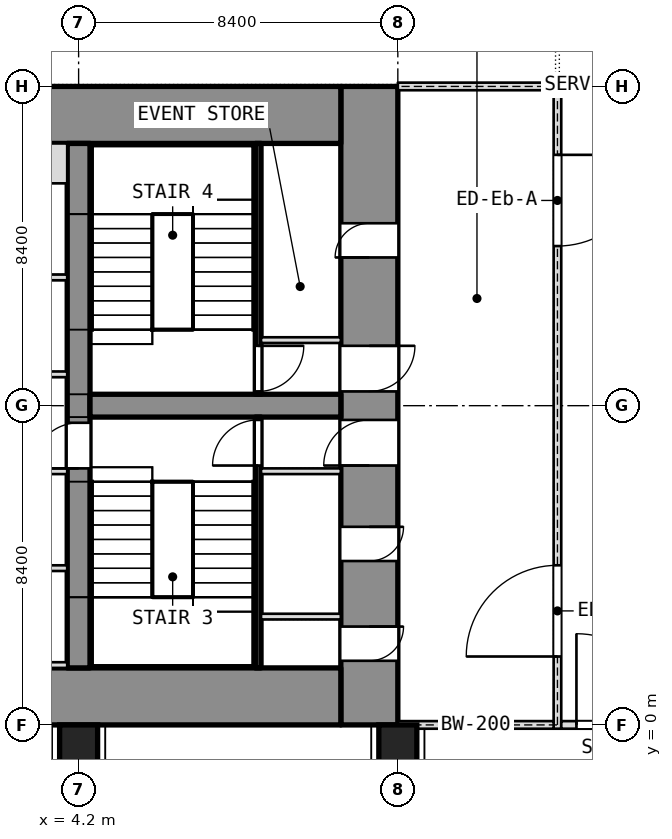
"""IFC4 building model, lengths in metres.
Left out: names, types, materials, properties, quantities, classifications, styles, units other than length and angle.
Written with IfcOpenShell. Run it as: python <this file> out.ifc"""

import sys

from ifc_helpers import new_model, si_unit, direction, frame, frame_2d, origin, origin_2d, place, context, subcontext, project, spatial, rectangle, extrude, element, fill, save


model = new_model("IFC4")
c1 = context("Model", 3, precision=1e-05, world=origin(), true_north=direction((0.0, 1.0)))
c2 = subcontext(c1, "Body", "Model", "MODEL_VIEW")
j1 = project(units=[si_unit("LENGTHUNIT", "METRE"), si_unit("PLANEANGLEUNIT", "RADIAN")], contexts=[c1])
p1 = place(None, origin())
s1 = spatial("IfcSite", under=j1, at=p1, CompositionType="ELEMENT")
p2 = place(p1, origin())
s2 = spatial("IfcBuilding", under=s1, at=p2, CompositionType="ELEMENT")
p3 = place(p2, frame((0.0, 0.0, 31.0)))
s3 = spatial("IfcBuildingStorey", under=s2, at=p3, CompositionType="ELEMENT", Elevation=31.0)
p4 = place(p3, frame((11.85, 0.0, 0.0), z_axis=(0.0, 0.0, 1.0), x_axis=(0.0, 1.0, 0.0)))
e1 = element("IfcWall", 1, at=p4, inside=s3, PredefinedType="SHEAR", context=c2, shape_type="SweptSolid", body=[
    extrude(rectangle(XDim=16.8, YDim=1.5, at=frame_2d((8.4, 0.0))), origin(), (0.0, 0.0, 1.0), 5.5),
])
p5 = place(p4, frame((1.688, 0.0, 0.0)))
e2 = element("IfcOpeningElement", 2, at=p5, cuts=e1, PredefinedType="OPENING", context=c2, shape_type="SweptSolid", body=[
    extrude(rectangle(XDim=0.9, YDim=2.1, at=frame_2d((0.45, 1.05))), frame((0.0, 0.75, 0.0), z_axis=(0.0, -1.0, 0.0), x_axis=(1.0, 0.0, 0.0)), (0.0, 0.0, 1.0), 1.5),
])
p6 = place(p4, frame((4.312, 0.0, 0.0)))
e3 = element("IfcOpeningElement", 3, at=p6, cuts=e1, PredefinedType="OPENING", context=c2, shape_type="SweptSolid", body=[
    extrude(rectangle(XDim=0.9, YDim=2.1, at=frame_2d((0.45, 1.05))), frame((0.0, 0.75, 0.0), z_axis=(0.0, -1.0, 0.0), x_axis=(1.0, 0.0, 0.0)), (0.0, 0.0, 1.0), 1.5),
])
p7 = place(p4, frame((6.825, 0.0, 0.0)))
e4 = element("IfcOpeningElement", 4, at=p7, cuts=e1, PredefinedType="OPENING", context=c2, shape_type="SweptSolid", body=[
    extrude(rectangle(XDim=1.2, YDim=2.1, at=frame_2d((0.6, 1.05))), frame((0.0, 0.75, 0.0), z_axis=(0.0, -1.0, 0.0), x_axis=(1.0, 0.0, 0.0)), (0.0, 0.0, 1.0), 1.5),
])
p8 = place(p4, frame((12.3, 0.0, 0.0)))
e5 = element("IfcOpeningElement", 5, at=p8, cuts=e1, PredefinedType="OPENING", context=c2, shape_type="SweptSolid", body=[
    extrude(rectangle(XDim=0.9, YDim=2.1, at=frame_2d((0.45, 1.05))), frame((0.0, 0.75, 0.0), z_axis=(0.0, -1.0, 0.0), x_axis=(1.0, 0.0, 0.0)), (0.0, 0.0, 1.0), 1.5),
])
p9 = place(p4, frame((8.775, 0.0, 0.0)))
e6 = element("IfcOpeningElement", 6, at=p9, cuts=e1, PredefinedType="OPENING", context=c2, shape_type="SweptSolid", body=[
    extrude(rectangle(XDim=1.2, YDim=2.1, at=frame_2d((0.6, 1.05))), frame((0.0, 0.75, 0.0), z_axis=(0.0, -1.0, 0.0), x_axis=(1.0, 0.0, 0.0)), (0.0, 0.0, 1.0), 1.5),
])
for number, where, z_axis, x_axis in (
    (7, (-11.1, 0.75, 0.0), (0.0, 0.0, 1.0), (1.0, 0.0, 0.0)),
    (8, (-11.1, 16.05, 0.0), (0.0, 0.0, 1.0), (1.0, 0.0, 0.0)),
):
    element("IfcWall", number, at=place(p3, frame(where, z_axis=z_axis, x_axis=x_axis)), inside=s3, PredefinedType="SHEAR", context=c2, shape_type="SweptSolid", body=[
        extrude(rectangle(XDim=22.2, YDim=1.5, at=frame_2d((11.1, 0.0))), origin(), (0.0, 0.0, 1.0), 5.5),
    ])
p10 = place(p3, frame((4.2, 1.5, 0.0), z_axis=(0.0, 0.0, 1.0), x_axis=(0.0, 1.0, 0.0)))
e9 = element("IfcWall", 9, at=p10, inside=s3, PredefinedType="SHEAR", context=c2, shape_type="SweptSolid", body=[
    extrude(rectangle(XDim=13.8, YDim=0.6, at=frame_2d((6.9, 0.0))), origin(), (0.0, 0.0, 1.0), 5.5),
])
p11 = place(p10, frame((5.25, 0.0, 0.0)))
e10 = element("IfcOpeningElement", 10, at=p11, cuts=e9, PredefinedType="OPENING", context=c2, shape_type="SweptSolid", body=[
    extrude(rectangle(XDim=1.2, YDim=2.1, at=frame_2d((0.6, 1.05))), frame((0.0, 0.3, 0.0), z_axis=(0.0, -1.0, 0.0), x_axis=(1.0, 0.0, 0.0)), (0.0, 0.0, 1.0), 0.6),
])
p12 = place(p3, frame((4.5, 8.4, 0.0), z_axis=(0.0, 0.0, 1.0), x_axis=(1.0, 0.0, 0.0)))
e11 = element("IfcWall", 11, at=p12, inside=s3, PredefinedType="SHEAR", context=c2, shape_type="SweptSolid", body=[
    extrude(rectangle(XDim=6.6, YDim=0.6, at=frame_2d((3.3, 0.0))), origin(), (0.0, 0.0, 1.0), 5.5),
])
for number, where, z_axis, x_axis in (
    (12, (4.2, -0.5, 0.0), (0.0, 0.0, 1.0), (1.0, 0.0, 0.0)),
    (13, (12.6, -0.5, 0.0), (0.0, 0.0, 1.0), (1.0, 0.0, 0.0)),
):
    element("IfcColumn", number, at=place(p3, frame(where, z_axis=z_axis, x_axis=x_axis)), inside=s3, PredefinedType="COLUMN", context=c2, shape_type="SweptSolid", body=[
        extrude(rectangle(XDim=1.0, YDim=1.0, at=origin_2d()), origin(), (0.0, 0.0, 1.0), 5.5),
    ])
p13 = place(p3, frame((8.925, 1.5, 0.0), z_axis=(0.0, 0.0, 1.0), x_axis=(0.0, 1.0, 0.0)))
e14 = element("IfcWall", 14, at=p13, inside=s3, PredefinedType="SHEAR", context=c2, shape_type="SweptSolid", body=[
    extrude(rectangle(XDim=6.6, YDim=0.15, at=frame_2d((3.3, 0.0))), origin(), (0.0, 0.0, 1.0), 5.35),
])
p14 = place(p13, frame((5.325, 0.0, 0.0)))
e15 = element("IfcOpeningElement", 15, at=p14, cuts=e14, PredefinedType="OPENING", context=c2, shape_type="SweptSolid", body=[
    extrude(rectangle(XDim=1.2, YDim=2.1, at=frame_2d((0.6, 1.05))), frame((0.0, 0.075, 0.0), z_axis=(0.0, -1.0, 0.0), x_axis=(1.0, 0.0, 0.0)), (0.0, 0.0, 1.0), 0.15),
])
for number, where, z_axis, x_axis in (
    (16, (9.0, 6.675, 0.0), (0.0, 0.0, 1.0), (1.0, 0.0, 0.0)),
    (17, (9.0, 2.85, 0.0), (0.0, 0.0, 1.0), (1.0, 0.0, 0.0)),
):
    element("IfcWall", number, at=place(p3, frame(where, z_axis=z_axis, x_axis=x_axis)), inside=s3, PredefinedType="PARTITIONING", context=c2, shape_type="SweptSolid", body=[
        extrude(rectangle(XDim=2.1, YDim=0.15, at=frame_2d((1.05, 0.0))), origin(), (0.0, 0.0, 1.0), 5.35),
    ])
p15 = place(p3, frame((8.925, 8.7, 0.0), z_axis=(0.0, 0.0, 1.0), x_axis=(0.0, 1.0, 0.0)))
e18 = element("IfcWall", 18, at=p15, inside=s3, PredefinedType="SHEAR", context=c2, shape_type="SweptSolid", body=[
    extrude(rectangle(XDim=6.6, YDim=0.15, at=frame_2d((3.3, 0.0))), origin(), (0.0, 0.0, 1.0), 5.35),
])
p16 = place(p15, frame((0.075, 0.0, 0.0)))
e19 = element("IfcOpeningElement", 19, at=p16, cuts=e18, PredefinedType="OPENING", context=c2, shape_type="SweptSolid", body=[
    extrude(rectangle(XDim=1.2, YDim=2.1, at=frame_2d((0.6, 1.05))), frame((0.0, 0.075, 0.0), z_axis=(0.0, -1.0, 0.0), x_axis=(1.0, 0.0, 0.0)), (0.0, 0.0, 1.0), 0.15),
])
p17 = place(p3, frame((9.0, 10.125, 0.0), z_axis=(0.0, 0.0, 1.0), x_axis=(1.0, 0.0, 0.0)))
e20 = element("IfcWall", 20, at=p17, inside=s3, PredefinedType="PARTITIONING", context=c2, shape_type="SweptSolid", body=[
    extrude(rectangle(XDim=2.1, YDim=0.15, at=frame_2d((1.05, 0.0))), origin(), (0.0, 0.0, 1.0), 5.35),
])
p18 = place(p3, frame((-3.9, 4.125, 0.0), z_axis=(0.0, 0.0, 1.0), x_axis=(1.0, 0.0, 0.0)))
e21 = element("IfcWall", 21, at=p18, inside=s3, PredefinedType="PARTITIONING", context=c2, shape_type="SweptSolid", body=[
    extrude(rectangle(XDim=7.8, YDim=0.15, at=frame_2d((3.9, 0.0))), origin(), (0.0, 0.0, 1.0), 5.35),
])
p19 = place(p18, frame((3.75, 0.0, 0.0)))
e22 = element("IfcOpeningElement", 22, at=p19, cuts=e21, PredefinedType="OPENING", context=c2, shape_type="SweptSolid", body=[
    extrude(rectangle(XDim=1.2, YDim=2.1, at=frame_2d((0.6, 1.05))), frame((0.0, 0.075, 0.0), z_axis=(0.0, -1.0, 0.0), x_axis=(1.0, 0.0, 0.0)), (0.0, 0.0, 1.0), 0.15),
])
p20 = place(p3, frame((-3.9, 11.775, 0.0), z_axis=(0.0, 0.0, 1.0), x_axis=(1.0, 0.0, 0.0)))
e23 = element("IfcWall", 23, at=p20, inside=s3, PredefinedType="PARTITIONING", context=c2, shape_type="SweptSolid", body=[
    extrude(rectangle(XDim=7.8, YDim=0.15, at=frame_2d((3.9, 0.0))), origin(), (0.0, 0.0, 1.0), 5.35),
])
p21 = place(p20, frame((3.3, 0.0, 0.0)))
e24 = element("IfcOpeningElement", 24, at=p21, cuts=e23, PredefinedType="OPENING", context=c2, shape_type="SweptSolid", body=[
    extrude(rectangle(XDim=1.2, YDim=2.1, at=frame_2d((0.6, 1.05))), frame((0.0, 0.075, 0.0), z_axis=(0.0, -1.0, 0.0), x_axis=(1.0, 0.0, 0.0)), (0.0, 0.0, 1.0), 0.15),
])
p22 = place(p3, frame((1.65, 1.575, 0.0), z_axis=(0.0, 0.0, 1.0), x_axis=(1.0, 0.0, 0.0)))
e25 = element("IfcWall", 25, at=p22, inside=s3, PredefinedType="SHEAR", context=c2, shape_type="SweptSolid", body=[
    extrude(rectangle(XDim=2.25, YDim=0.15, at=frame_2d((1.125, 0.0))), origin(), (0.0, 0.0, 1.0), 5.5),
])
p23 = place(p3, frame((1.65, 14.775, 0.0), z_axis=(0.0, 0.0, 1.0), x_axis=(1.0, 0.0, 0.0)))
e26 = element("IfcWall", 26, at=p23, inside=s3, PredefinedType="SHEAR", context=c2, shape_type="SweptSolid", body=[
    extrude(rectangle(XDim=2.25, YDim=1.05, at=frame_2d((1.125, 0.0))), origin(), (0.0, 0.0, 1.0), 5.5),
])
for number, where, z_axis, x_axis in (
    (27, (1.65, 6.675, 0.0), (0.0, 0.0, 1.0), (1.0, 0.0, 0.0)),
    (28, (1.65, 9.225, 0.0), (0.0, 0.0, 1.0), (1.0, 0.0, 0.0)),
):
    element("IfcWall", number, at=place(p3, frame(where, z_axis=z_axis, x_axis=x_axis)), inside=s3, PredefinedType="SHEAR", context=c2, shape_type="SweptSolid", body=[
        extrude(rectangle(XDim=2.25, YDim=0.15, at=frame_2d((1.125, 0.0))), origin(), (0.0, 0.0, 1.0), 5.5),
    ])
p24 = place(p3, frame((16.8, -0.1, 0.0), z_axis=(0.0, 0.0, 1.0), x_axis=(0.0, 1.0, 0.0)))
e29 = element("IfcWall", 29, at=p24, inside=s3, PredefinedType="PARTITIONING", context=c2, shape_type="SweptSolid", body=[
    extrude(rectangle(XDim=17.0, YDim=0.2, at=frame_2d((8.5, 0.0))), origin(), (0.0, 0.0, 1.0), 4.95),
])
p25 = place(p24, frame((1.9, 0.0, 0.0)))
e30 = element("IfcOpeningElement", 30, at=p25, cuts=e29, PredefinedType="OPENING", context=c2, shape_type="SweptSolid", body=[
    extrude(rectangle(XDim=2.4, YDim=2.1, at=frame_2d((1.2, 1.05))), frame((0.0, 0.1, 0.0), z_axis=(0.0, -1.0, 0.0), x_axis=(1.0, 0.0, 0.0)), (0.0, 0.0, 1.0), 0.2),
])
p26 = place(p24, frame((12.7, 0.0, 0.0)))
e31 = element("IfcOpeningElement", 31, at=p26, cuts=e29, PredefinedType="OPENING", context=c2, shape_type="SweptSolid", body=[
    extrude(rectangle(XDim=2.4, YDim=2.1, at=frame_2d((1.2, 1.05))), frame((0.0, 0.1, 0.0), z_axis=(0.0, -1.0, 0.0), x_axis=(1.0, 0.0, 0.0)), (0.0, 0.0, 1.0), 0.2),
])
for number, where, z_axis, x_axis in (
    (32, (12.6, 0.0, 0.0), (0.0, 0.0, 1.0), (1.0, 0.0, 0.0)),
    (33, (12.6, 16.8, 0.0), (0.0, 0.0, 1.0), (1.0, 0.0, 0.0)),
):
    element("IfcWall", number, at=place(p3, frame(where, z_axis=z_axis, x_axis=x_axis)), inside=s3, PredefinedType="PARTITIONING", context=c2, shape_type="SweptSolid", body=[
        extrude(rectangle(XDim=4.1, YDim=0.2, at=frame_2d((2.05, 0.0))), origin(), (0.0, 0.0, 1.0), 4.85),
    ])
p27 = place(p3, frame((16.901, 0.0, 0.0), z_axis=(0.0, 0.0, 1.0), x_axis=(1.0, 0.0, 0.0)))
e34 = element("IfcWall", 34, at=p27, inside=s3, PredefinedType="PARTITIONING", context=c2, shape_type="SweptSolid", body=[
    extrude(rectangle(XDim=3.198, YDim=0.2, at=frame_2d((1.599, 0.0))), origin(), (0.0, 0.0, 1.0), 4.85),
])
p28 = place(p27, frame((0.399, 0.0, 0.0)))
e35 = element("IfcOpeningElement", 35, at=p28, cuts=e34, PredefinedType="OPENING", context=c2, shape_type="SweptSolid", body=[
    extrude(rectangle(XDim=2.4, YDim=2.1, at=frame_2d((1.2, 1.05))), frame((0.0, 0.1, 0.0), z_axis=(0.0, -1.0, 0.0), x_axis=(1.0, 0.0, 0.0)), (0.0, 0.0, 1.0), 0.2),
])
p29 = place(p5, origin())
e36 = element("IfcDoor", 36, at=p29, inside=s3, OperationType="SINGLE_SWING_LEFT", PredefinedType="DOOR", context=c2, shape_type="SweptSolid", body=[
    extrude(rectangle(XDim=0.9, YDim=2.1, at=frame_2d((0.45, 1.05))), frame((0.0, 0.025, 0.0), z_axis=(0.0, -1.0, 0.0), x_axis=(1.0, 0.0, 0.0)), (0.0, 0.0, 1.0), 0.05),
])
fill(e2, e36)
p30 = place(p6, origin())
e37 = element("IfcDoor", 37, at=p30, inside=s3, OperationType="SINGLE_SWING_LEFT", PredefinedType="DOOR", context=c2, shape_type="SweptSolid", body=[
    extrude(rectangle(XDim=0.9, YDim=2.1, at=frame_2d((0.45, 1.05))), frame((0.0, 0.025, 0.0), z_axis=(0.0, -1.0, 0.0), x_axis=(1.0, 0.0, 0.0)), (0.0, 0.0, 1.0), 0.05),
])
fill(e3, e37)
p31 = place(p7, origin())
e38 = element("IfcDoor", 38, at=p31, inside=s3, OperationType="SINGLE_SWING_LEFT", PredefinedType="DOOR", context=c2, shape_type="SweptSolid", body=[
    extrude(rectangle(XDim=1.2, YDim=2.1, at=frame_2d((0.6, 1.05))), frame((0.0, 0.025, 0.0), z_axis=(0.0, -1.0, 0.0), x_axis=(1.0, 0.0, 0.0)), (0.0, 0.0, 1.0), 0.05),
])
fill(e4, e38)
p32 = place(p14, origin())
e39 = element("IfcDoor", 39, at=p32, inside=s3, OperationType="SINGLE_SWING_LEFT", PredefinedType="DOOR", context=c2, shape_type="SweptSolid", body=[
    extrude(rectangle(XDim=1.2, YDim=2.1, at=frame_2d((0.6, 1.05))), frame((0.0, 0.025, 0.0), z_axis=(0.0, -1.0, 0.0), x_axis=(1.0, 0.0, 0.0)), (0.0, 0.0, 1.0), 0.05),
])
fill(e15, e39)
p33 = place(p8, origin())
e40 = element("IfcDoor", 40, at=p33, inside=s3, OperationType="SINGLE_SWING_LEFT", PredefinedType="DOOR", context=c2, shape_type="SweptSolid", body=[
    extrude(rectangle(XDim=0.9, YDim=2.1, at=frame_2d((0.45, 1.05))), frame((0.0, 0.025, 0.0), z_axis=(0.0, -1.0, 0.0), x_axis=(1.0, 0.0, 0.0)), (0.0, 0.0, 1.0), 0.05),
])
fill(e5, e40)
p34 = place(p9, origin())
e41 = element("IfcDoor", 41, at=p34, inside=s3, OperationType="SINGLE_SWING_LEFT", PredefinedType="DOOR", context=c2, shape_type="SweptSolid", body=[
    extrude(rectangle(XDim=1.2, YDim=2.1, at=frame_2d((0.6, 1.05))), frame((0.0, 0.025, 0.0), z_axis=(0.0, -1.0, 0.0), x_axis=(1.0, 0.0, 0.0)), (0.0, 0.0, 1.0), 0.05),
])
fill(e6, e41)
p35 = place(p16, origin())
e42 = element("IfcDoor", 42, at=p35, inside=s3, OperationType="SINGLE_SWING_LEFT", PredefinedType="DOOR", context=c2, shape_type="SweptSolid", body=[
    extrude(rectangle(XDim=1.2, YDim=2.1, at=frame_2d((0.6, 1.05))), frame((0.0, 0.025, 0.0), z_axis=(0.0, -1.0, 0.0), x_axis=(1.0, 0.0, 0.0)), (0.0, 0.0, 1.0), 0.05),
])
fill(e19, e42)
p36 = place(p11, origin())
e43 = element("IfcDoor", 43, at=p36, inside=s3, OperationType="SINGLE_SWING_LEFT", PredefinedType="DOOR", context=c2, shape_type="SweptSolid", body=[
    extrude(rectangle(XDim=1.2, YDim=2.1, at=frame_2d((0.6, 1.05))), frame((0.0, 0.025, 0.0), z_axis=(0.0, -1.0, 0.0), x_axis=(1.0, 0.0, 0.0)), (0.0, 0.0, 1.0), 0.05),
])
fill(e10, e43)
p37 = place(p25, origin())
e44 = element("IfcDoor", 44, at=p37, inside=s3, OperationType="DOUBLE_DOOR_SINGLE_SWING", PredefinedType="DOOR", context=c2, shape_type="SweptSolid", body=[
    extrude(rectangle(XDim=2.4, YDim=2.1, at=frame_2d((1.2, 1.05))), frame((0.0, 0.025, 0.0), z_axis=(0.0, -1.0, 0.0), x_axis=(1.0, 0.0, 0.0)), (0.0, 0.0, 1.0), 0.05),
])
fill(e30, e44)
p38 = place(p26, origin())
e45 = element("IfcDoor", 45, at=p38, inside=s3, OperationType="DOUBLE_DOOR_SINGLE_SWING", PredefinedType="DOOR", context=c2, shape_type="SweptSolid", body=[
    extrude(rectangle(XDim=2.4, YDim=2.1, at=frame_2d((1.2, 1.05))), frame((0.0, 0.025, 0.0), z_axis=(0.0, -1.0, 0.0), x_axis=(1.0, 0.0, 0.0)), (0.0, 0.0, 1.0), 0.05),
])
fill(e31, e45)
p39 = place(p28, origin())
e46 = element("IfcDoor", 46, at=p39, inside=s3, OperationType="DOUBLE_DOOR_DOUBLE_SWING", PredefinedType="DOOR", context=c2, shape_type="SweptSolid", body=[
    extrude(rectangle(XDim=2.4, YDim=2.1, at=frame_2d((1.2, 1.05))), frame((0.0, 0.025, 0.0), z_axis=(0.0, -1.0, 0.0), x_axis=(1.0, 0.0, 0.0)), (0.0, 0.0, 1.0), 0.05),
])
fill(e35, e46)
save(model, sys.argv[1])
